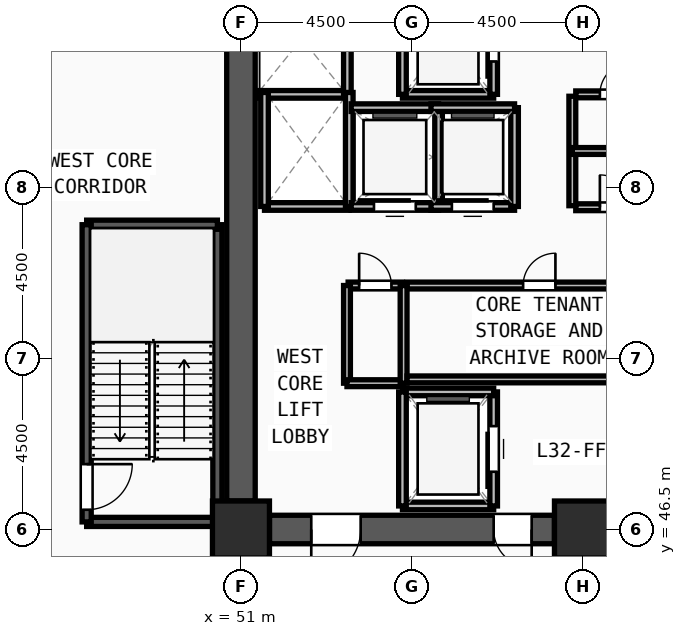
"""IFC4 building model, lengths in metres.
Left out: names, types, materials, properties, quantities, classifications, styles, units other than length and angle.
Written with IfcOpenShell. Run it as: python <this file> out.ifc"""

import sys

from ifc_helpers import new_model, si_unit, direction, frame, frame_2d, origin, origin_2d, place, context, subcontext, project, spatial, rectangle, extrude, source, transform, mapped, element, fill, save


model = new_model("IFC4")
c1 = context("Model", 3, precision=1e-05, world=origin(), true_north=direction((0.0, 1.0)))
c2 = subcontext(c1, "Body", "Model", "MODEL_VIEW")
j1 = project(units=[si_unit("LENGTHUNIT", "METRE"), si_unit("PLANEANGLEUNIT", "RADIAN")], contexts=[c1])
p1 = place(None, origin())
s1 = spatial("IfcSite", under=j1, at=p1, CompositionType="ELEMENT")
p2 = place(p1, origin())
s2 = spatial("IfcBuilding", under=s1, at=p2, CompositionType="ELEMENT")
p3 = place(p2, frame((0.0, 0.0, 124.5)))
s3 = spatial("IfcBuildingStorey", under=s2, at=p3, CompositionType="ELEMENT", Elevation=124.5)
m1 = source(origin(), c2, "Body", "SweptSolid", [
    extrude(rectangle(XDim=1.5, YDim=1.5, at=origin_2d()), origin(), (0.0, 0.0, 1.0), 3.75),
])
for number, where, z_axis, x_axis in (
    (1, (51.0, 46.5, 0.0), (0.0, 0.0, 1.0), (1.0, 0.0, 0.0)),
    (2, (60.0, 46.5, 0.0), (0.0, 0.0, 1.0), (1.0, 0.0, 0.0)),
):
    element("IfcColumn", number, at=place(p3, frame(where, z_axis=z_axis, x_axis=x_axis)), inside=s3, PredefinedType="COLUMN", context=c2, shape_type="MappedRepresentation", body=[
        mapped(m1, transform((0.0, 0.0, 0.0), x_axis=(1.0, 0.0, 0.0), y_axis=(0.0, 1.0, 0.0), z_axis=(0.0, 0.0, 1.0), scale=1.0)),
    ])
p4 = place(p3, frame((59.25, 46.5, 0.0), z_axis=(0.0, 0.0, 1.0), x_axis=(-1.0, 0.0, 0.0)))
e3 = element("IfcWall", 3, at=p4, inside=s3, PredefinedType="SHEAR", context=c2, shape_type="SweptSolid", body=[
    extrude(rectangle(XDim=7.5, YDim=0.75, at=frame_2d((3.75, 0.0))), origin(), (0.0, 0.0, 1.0), 3.57),
])
m2 = source(origin(), c2, "Body", "SweptSolid", [
    extrude(rectangle(XDim=1.3, YDim=2.2, at=frame_2d((0.65, 1.1))), frame((0.0, 0.385, 0.0), z_axis=(0.0, -1.0, 0.0), x_axis=(1.0, 0.0, 0.0)), (0.0, 0.0, 1.0), 0.77),
])
p5 = place(p4, frame((5.1, 0.0, 0.0)))
e4 = element("IfcOpeningElement", 4, at=p5, cuts=e3, PredefinedType="OPENING", context=c2, shape_type="MappedRepresentation", body=[
    mapped(m2, transform((0.0, 0.0, 0.0), x_axis=(1.0, 0.0, 0.0), y_axis=(0.0, 1.0, 0.0), z_axis=(0.0, 0.0, 1.0), scale=1.0)),
])
m3 = source(origin(), c2, "Body", "SweptSolid", [
    extrude(rectangle(XDim=1.0, YDim=2.2, at=frame_2d((0.5, 1.1))), frame((0.0, 0.385, 0.0), z_axis=(0.0, -1.0, 0.0), x_axis=(1.0, 0.0, 0.0)), (0.0, 0.0, 1.0), 0.77),
])
p6 = place(p4, frame((0.6, 0.0, 0.0)))
e5 = element("IfcOpeningElement", 5, at=p6, cuts=e3, PredefinedType="OPENING", context=c2, shape_type="MappedRepresentation", body=[
    mapped(m3, transform((0.0, 0.0, 0.0), x_axis=(1.0, 0.0, 0.0), y_axis=(0.0, 1.0, 0.0), z_axis=(0.0, 0.0, 1.0), scale=1.0)),
])
p7 = place(p3, frame((51.0, 47.25, 0.0), z_axis=(0.0, 0.0, 1.0), x_axis=(0.0, 1.0, 0.0)))
e6 = element("IfcWall", 6, at=p7, inside=s3, PredefinedType="SHEAR", context=c2, shape_type="SweptSolid", body=[
    extrude(rectangle(XDim=13.5, YDim=0.75, at=frame_2d((6.75, 0.0))), origin(), (0.0, 0.0, 1.0), 3.57),
])
p8 = place(p3, frame((46.94, 46.7, 0.0), z_axis=(0.0, 0.0, 1.0), x_axis=(1.0, 0.0, 0.0)))
e7 = element("IfcWall", 7, at=p8, inside=s3, PredefinedType="SOLIDWALL", context=c2, shape_type="SweptSolid", body=[
    extrude(rectangle(XDim=3.44, YDim=0.24, at=frame_2d((1.72, 0.0))), origin(), (0.0, 0.0, 1.0), 3.57),
])
p9 = place(p3, frame((50.38, 46.7, 0.0), z_axis=(0.0, 0.0, 1.0), x_axis=(0.0, 1.0, 0.0)))
e8 = element("IfcWall", 8, at=p9, inside=s3, PredefinedType="SOLIDWALL", context=c2, shape_type="SweptSolid", body=[
    extrude(rectangle(XDim=7.82, YDim=0.24, at=frame_2d((3.91, 0.0))), origin(), (0.0, 0.0, 1.0), 3.57),
])
p10 = place(p3, frame((50.38, 54.52, 0.0), z_axis=(0.0, 0.0, 1.0), x_axis=(-1.0, 0.0, 0.0)))
e9 = element("IfcWall", 9, at=p10, inside=s3, PredefinedType="SOLIDWALL", context=c2, shape_type="SweptSolid", body=[
    extrude(rectangle(XDim=3.44, YDim=0.24, at=frame_2d((1.72, 0.0))), origin(), (0.0, 0.0, 1.0), 3.57),
])
p11 = place(p3, frame((46.94, 54.52, 0.0), z_axis=(0.0, 0.0, 1.0), x_axis=(0.0, -1.0, 0.0)))
e10 = element("IfcWall", 10, at=p11, inside=s3, PredefinedType="SOLIDWALL", context=c2, shape_type="SweptSolid", body=[
    extrude(rectangle(XDim=7.82, YDim=0.24, at=frame_2d((3.91, 0.0))), origin(), (0.0, 0.0, 1.0), 3.57),
])
m4 = source(origin(), c2, "Body", "SweptSolid", [
    extrude(rectangle(XDim=1.2, YDim=2.2, at=frame_2d((0.6, 1.1))), frame((0.0, 0.13, 0.0), z_axis=(0.0, -1.0, 0.0), x_axis=(1.0, 0.0, 0.0)), (0.0, 0.0, 1.0), 0.26),
])
p12 = place(p11, frame((6.3, 0.0, 0.0)))
e11 = element("IfcOpeningElement", 11, at=p12, cuts=e10, PredefinedType="OPENING", context=c2, shape_type="MappedRepresentation", body=[
    mapped(m4, transform((0.0, 0.0, 0.0), x_axis=(1.0, 0.0, 0.0), y_axis=(0.0, 1.0, 0.0), z_axis=(0.0, 0.0, 1.0), scale=1.0)),
])
p13 = place(p3, frame((55.25, 47.12, 0.0), z_axis=(0.0, 0.0, 1.0), x_axis=(1.0, 0.0, 0.0)))
e12 = element("IfcWall", 12, at=p13, inside=s3, PredefinedType="SOLIDWALL", context=c2, shape_type="SweptSolid", body=[
    extrude(rectangle(XDim=2.4, YDim=0.2, at=frame_2d((1.2, 0.0))), origin(), (0.0, 0.0, 1.0), 3.57),
])
p14 = place(p3, frame((57.65, 47.12, 0.0), z_axis=(0.0, 0.0, 1.0), x_axis=(0.0, 1.0, 0.0)))
e13 = element("IfcWall", 13, at=p14, inside=s3, PredefinedType="SOLIDWALL", context=c2, shape_type="SweptSolid", body=[
    extrude(rectangle(XDim=3.0, YDim=0.2, at=frame_2d((1.5, 0.0))), origin(), (0.0, 0.0, 1.0), 3.57),
])
m5 = source(origin(), c2, "Body", "SweptSolid", [
    extrude(rectangle(XDim=1.2, YDim=2.3, at=frame_2d((0.6, 1.15))), frame((0.0, 0.11, 0.0), z_axis=(0.0, -1.0, 0.0), x_axis=(1.0, 0.0, 0.0)), (0.0, 0.0, 1.0), 0.22),
])
p15 = place(p14, frame((0.9, 0.0, 0.0)))
e14 = element("IfcOpeningElement", 14, at=p15, cuts=e13, PredefinedType="OPENING", context=c2, shape_type="MappedRepresentation", body=[
    mapped(m5, transform((0.0, 0.0, 0.0), x_axis=(1.0, 0.0, 0.0), y_axis=(0.0, 1.0, 0.0), z_axis=(0.0, 0.0, 1.0), scale=1.0)),
])
p16 = place(p3, frame((57.65, 50.12, 0.0), z_axis=(0.0, 0.0, 1.0), x_axis=(-1.0, 0.0, 0.0)))
e15 = element("IfcWall", 15, at=p16, inside=s3, PredefinedType="SOLIDWALL", context=c2, shape_type="SweptSolid", body=[
    extrude(rectangle(XDim=2.4, YDim=0.2, at=frame_2d((1.2, 0.0))), origin(), (0.0, 0.0, 1.0), 3.57),
])
p17 = place(p3, frame((55.25, 50.12, 0.0), z_axis=(0.0, 0.0, 1.0), x_axis=(0.0, -1.0, 0.0)))
e16 = element("IfcWall", 16, at=p17, inside=s3, PredefinedType="SOLIDWALL", context=c2, shape_type="SweptSolid", body=[
    extrude(rectangle(XDim=3.0, YDim=0.2, at=frame_2d((1.5, 0.0))), origin(), (0.0, 0.0, 1.0), 3.57),
])
p18 = place(p3, frame((55.25, 57.95, 0.0), z_axis=(0.0, 0.0, 1.0), x_axis=(1.0, 0.0, 0.0)))
e17 = element("IfcWall", 17, at=p18, inside=s3, PredefinedType="SOLIDWALL", context=c2, shape_type="SweptSolid", body=[
    extrude(rectangle(XDim=2.4, YDim=0.2, at=frame_2d((1.2, 0.0))), origin(), (0.0, 0.0, 1.0), 3.57),
])
p19 = place(p3, frame((57.65, 57.95, 0.0), z_axis=(0.0, 0.0, 1.0), x_axis=(0.0, 1.0, 0.0)))
e18 = element("IfcWall", 18, at=p19, inside=s3, PredefinedType="SOLIDWALL", context=c2, shape_type="SweptSolid", body=[
    extrude(rectangle(XDim=2.93, YDim=0.2, at=frame_2d((1.465, 0.0))), origin(), (0.0, 0.0, 1.0), 3.57),
])
p20 = place(p19, frame((0.865, 0.0, 0.0)))
e19 = element("IfcOpeningElement", 19, at=p20, cuts=e18, PredefinedType="OPENING", context=c2, shape_type="MappedRepresentation", body=[
    mapped(m5, transform((0.0, 0.0, 0.0), x_axis=(1.0, 0.0, 0.0), y_axis=(0.0, 1.0, 0.0), z_axis=(0.0, 0.0, 1.0), scale=1.0)),
])
p21 = place(p3, frame((55.25, 60.88, 0.0), z_axis=(0.0, 0.0, 1.0), x_axis=(0.0, -1.0, 0.0)))
e20 = element("IfcWall", 20, at=p21, inside=s3, PredefinedType="SOLIDWALL", context=c2, shape_type="SweptSolid", body=[
    extrude(rectangle(XDim=2.93, YDim=0.2, at=frame_2d((1.465, 0.0))), origin(), (0.0, 0.0, 1.0), 3.57),
])
p22 = place(p3, frame((51.4, 57.95, 0.0), z_axis=(0.0, 0.0, 1.0), x_axis=(1.0, 0.0, 0.0)))
e21 = element("IfcWall", 21, at=p22, inside=s3, PredefinedType="SOLIDWALL", context=c2, shape_type="SweptSolid", body=[
    extrude(rectangle(XDim=2.4, YDim=0.2, at=frame_2d((1.2, 0.0))), origin(), (0.0, 0.0, 1.0), 3.57),
])
p23 = place(p3, frame((53.8, 57.95, 0.0), z_axis=(0.0, 0.0, 1.0), x_axis=(0.0, 1.0, 0.0)))
e22 = element("IfcWall", 22, at=p23, inside=s3, PredefinedType="SOLIDWALL", context=c2, shape_type="SweptSolid", body=[
    extrude(rectangle(XDim=2.93, YDim=0.2, at=frame_2d((1.465, 0.0))), origin(), (0.0, 0.0, 1.0), 3.57),
])
p24 = place(p3, frame((51.62, 55.0, 0.0), z_axis=(0.0, 0.0, 1.0), x_axis=(1.0, 0.0, 0.0)))
e23 = element("IfcWall", 23, at=p24, inside=s3, PredefinedType="SOLIDWALL", context=c2, shape_type="SweptSolid", body=[
    extrude(rectangle(XDim=2.23, YDim=0.2, at=frame_2d((1.115, 0.0))), origin(), (0.0, 0.0, 1.0), 3.57),
])
for number, where, z_axis, x_axis in (
    (24, (53.85, 55.0, 0.0), (0.0, 0.0, 1.0), (0.0, 1.0, 0.0)),
    (25, (51.62, 58.0, 0.0), (0.0, 0.0, 1.0), (0.0, -1.0, 0.0)),
):
    element("IfcWall", number, at=place(p3, frame(where, z_axis=z_axis, x_axis=x_axis)), inside=s3, PredefinedType="SOLIDWALL", context=c2, shape_type="SweptSolid", body=[
        extrude(rectangle(XDim=3.0, YDim=0.2, at=frame_2d((1.5, 0.0))), origin(), (0.0, 0.0, 1.0), 3.57),
    ])
p25 = place(p3, frame((53.9, 55.0, 0.0), z_axis=(0.0, 0.0, 1.0), x_axis=(1.0, 0.0, 0.0)))
e26 = element("IfcWall", 26, at=p25, inside=s3, PredefinedType="SOLIDWALL", context=c2, shape_type="SweptSolid", body=[
    extrude(rectangle(XDim=2.3, YDim=0.2, at=frame_2d((1.15, 0.0))), origin(), (0.0, 0.0, 1.0), 3.57),
])
m6 = source(origin(), c2, "Body", "SweptSolid", [
    extrude(rectangle(XDim=1.1, YDim=2.2, at=frame_2d((0.55, 1.1))), frame((0.0, 0.11, 0.0), z_axis=(0.0, -1.0, 0.0), x_axis=(1.0, 0.0, 0.0)), (0.0, 0.0, 1.0), 0.22),
])
p26 = place(p25, frame((0.6, 0.0, 0.0)))
e27 = element("IfcOpeningElement", 27, at=p26, cuts=e26, PredefinedType="OPENING", context=c2, shape_type="MappedRepresentation", body=[
    mapped(m6, transform((0.0, 0.0, 0.0), x_axis=(1.0, 0.0, 0.0), y_axis=(0.0, 1.0, 0.0), z_axis=(0.0, 0.0, 1.0), scale=1.0)),
])
p27 = place(p3, frame((56.2, 55.0, 0.0), z_axis=(0.0, 0.0, 1.0), x_axis=(0.0, 1.0, 0.0)))
e28 = element("IfcWall", 28, at=p27, inside=s3, PredefinedType="SOLIDWALL", context=c2, shape_type="SweptSolid", body=[
    extrude(rectangle(XDim=2.6, YDim=0.2, at=frame_2d((1.3, 0.0))), origin(), (0.0, 0.0, 1.0), 3.57),
])
p28 = place(p3, frame((56.2, 57.6, 0.0), z_axis=(0.0, 0.0, 1.0), x_axis=(-1.0, 0.0, 0.0)))
e29 = element("IfcWall", 29, at=p28, inside=s3, PredefinedType="SOLIDWALL", context=c2, shape_type="SweptSolid", body=[
    extrude(rectangle(XDim=2.3, YDim=0.2, at=frame_2d((1.15, 0.0))), origin(), (0.0, 0.0, 1.0), 3.57),
])
p29 = place(p3, frame((56.0, 55.0, 0.0), z_axis=(0.0, 0.0, 1.0), x_axis=(1.0, 0.0, 0.0)))
e30 = element("IfcWall", 30, at=p29, inside=s3, PredefinedType="SOLIDWALL", context=c2, shape_type="SweptSolid", body=[
    extrude(rectangle(XDim=2.2, YDim=0.2, at=frame_2d((1.1, 0.0))), origin(), (0.0, 0.0, 1.0), 3.57),
])
p30 = place(p29, frame((0.55, 0.0, 0.0)))
e31 = element("IfcOpeningElement", 31, at=p30, cuts=e30, PredefinedType="OPENING", context=c2, shape_type="MappedRepresentation", body=[
    mapped(m6, transform((0.0, 0.0, 0.0), x_axis=(1.0, 0.0, 0.0), y_axis=(0.0, 1.0, 0.0), z_axis=(0.0, 0.0, 1.0), scale=1.0)),
])
p31 = place(p3, frame((58.2, 55.0, 0.0), z_axis=(0.0, 0.0, 1.0), x_axis=(0.0, 1.0, 0.0)))
e32 = element("IfcWall", 32, at=p31, inside=s3, PredefinedType="SOLIDWALL", context=c2, shape_type="SweptSolid", body=[
    extrude(rectangle(XDim=2.6, YDim=0.2, at=frame_2d((1.3, 0.0))), origin(), (0.0, 0.0, 1.0), 3.57),
])
p32 = place(p3, frame((58.2, 57.6, 0.0), z_axis=(0.0, 0.0, 1.0), x_axis=(-1.0, 0.0, 0.0)))
e33 = element("IfcWall", 33, at=p32, inside=s3, PredefinedType="SOLIDWALL", context=c2, shape_type="SweptSolid", body=[
    extrude(rectangle(XDim=2.2, YDim=0.2, at=frame_2d((1.1, 0.0))), origin(), (0.0, 0.0, 1.0), 3.57),
])
p33 = place(p3, frame((55.37, 52.92, 0.0), z_axis=(0.0, 0.0, 1.0), x_axis=(1.0, 0.0, 0.0)))
e34 = element("IfcWall", 34, at=p33, inside=s3, PredefinedType="PARTITIONING", context=c2, shape_type="SweptSolid", body=[
    extrude(rectangle(XDim=6.93, YDim=0.18, at=frame_2d((3.465, 0.0))), origin(), (0.0, 0.0, 1.0), 3.57),
])
m7 = source(origin(), c2, "Body", "SweptSolid", [
    extrude(rectangle(XDim=0.85, YDim=2.1, at=frame_2d((0.425, 1.05))), frame((0.0, 0.1, 0.0), z_axis=(0.0, -1.0, 0.0), x_axis=(1.0, 0.0, 0.0)), (0.0, 0.0, 1.0), 0.2),
])
p34 = place(p33, frame((3.055, 0.0, 0.0)))
e35 = element("IfcOpeningElement", 35, at=p34, cuts=e34, PredefinedType="OPENING", context=c2, shape_type="MappedRepresentation", body=[
    mapped(m7, transform((0.0, 0.0, 0.0), x_axis=(1.0, 0.0, 0.0), y_axis=(0.0, 1.0, 0.0), z_axis=(0.0, 0.0, 1.0), scale=1.0)),
])
p35 = place(p3, frame((59.81, 54.98, 0.0), z_axis=(0.0, 0.0, 1.0), x_axis=(1.0, 0.0, 0.0)))
e36 = element("IfcWall", 36, at=p35, inside=s3, PredefinedType="PARTITIONING", context=c2, shape_type="SweptSolid", body=[
    extrude(rectangle(XDim=2.11, YDim=0.18, at=frame_2d((1.055, 0.0))), origin(), (0.0, 0.0, 1.0), 3.57),
])
p36 = place(p35, frame((0.635, 0.0, 0.0)))
e37 = element("IfcOpeningElement", 37, at=p36, cuts=e36, PredefinedType="OPENING", context=c2, shape_type="MappedRepresentation", body=[
    mapped(m7, transform((0.0, 0.0, 0.0), x_axis=(1.0, 0.0, 0.0), y_axis=(0.0, 1.0, 0.0), z_axis=(0.0, 0.0, 1.0), scale=1.0)),
])
p37 = place(p3, frame((59.81, 57.95, 0.0), z_axis=(0.0, 0.0, 1.0), x_axis=(1.0, 0.0, 0.0)))
e38 = element("IfcWall", 38, at=p37, inside=s3, PredefinedType="PARTITIONING", context=c2, shape_type="SweptSolid", body=[
    extrude(rectangle(XDim=2.11, YDim=0.18, at=frame_2d((1.055, 0.0))), origin(), (0.0, 0.0, 1.0), 3.57),
])
p38 = place(p37, frame((0.635, 0.0, 0.0)))
e39 = element("IfcOpeningElement", 39, at=p38, cuts=e38, PredefinedType="OPENING", context=c2, shape_type="MappedRepresentation", body=[
    mapped(m7, transform((0.0, 0.0, 0.0), x_axis=(1.0, 0.0, 0.0), y_axis=(0.0, 1.0, 0.0), z_axis=(0.0, 0.0, 1.0), scale=1.0)),
])
p39 = place(p3, frame((53.82, 52.92, 0.0), z_axis=(0.0, 0.0, 1.0), x_axis=(1.0, 0.0, 0.0)))
e40 = element("IfcWall", 40, at=p39, inside=s3, PredefinedType="PARTITIONING", context=c2, shape_type="SweptSolid", body=[
    extrude(rectangle(XDim=1.43, YDim=0.18, at=frame_2d((0.715, 0.0))), origin(), (0.0, 0.0, 1.0), 3.57),
])
p40 = place(p39, frame((0.29, 0.0, 0.0)))
e41 = element("IfcOpeningElement", 41, at=p40, cuts=e40, PredefinedType="OPENING", context=c2, shape_type="MappedRepresentation", body=[
    mapped(m7, transform((0.0, 0.0, 0.0), x_axis=(1.0, 0.0, 0.0), y_axis=(0.0, 1.0, 0.0), z_axis=(0.0, 0.0, 1.0), scale=1.0)),
])
p41 = place(p3, frame((59.72, 55.02, 0.0), z_axis=(0.0, 0.0, 1.0), x_axis=(0.0, 1.0, 0.0)))
e42 = element("IfcWall", 42, at=p41, inside=s3, PredefinedType="PARTITIONING", context=c2, shape_type="SweptSolid", body=[
    extrude(rectangle(XDim=2.88, YDim=0.18, at=frame_2d((1.44, 0.0))), origin(), (0.0, 0.0, 1.0), 3.57),
])
p42 = place(p3, frame((59.72, 56.46, 0.0), z_axis=(0.0, 0.0, 1.0), x_axis=(1.0, 0.0, 0.0)))
e43 = element("IfcWall", 43, at=p42, inside=s3, PredefinedType="PARTITIONING", context=c2, shape_type="SweptSolid", body=[
    extrude(rectangle(XDim=2.29, YDim=0.18, at=frame_2d((1.145, 0.0))), origin(), (0.0, 0.0, 1.0), 3.57),
])
p43 = place(p3, frame((53.79, 50.35, 0.0), z_axis=(0.0, 0.0, 1.0), x_axis=(0.0, 1.0, 0.0)))
e44 = element("IfcWall", 44, at=p43, inside=s3, PredefinedType="PARTITIONING", context=c2, shape_type="SweptSolid", body=[
    extrude(rectangle(XDim=2.57, YDim=0.18, at=frame_2d((1.285, 0.0))), origin(), (0.0, 0.0, 1.0), 3.57),
])
p44 = place(p3, frame((53.79, 50.35, 0.0), z_axis=(0.0, 0.0, 1.0), x_axis=(1.0, 0.0, 0.0)))
e45 = element("IfcWall", 45, at=p44, inside=s3, PredefinedType="PARTITIONING", context=c2, shape_type="SweptSolid", body=[
    extrude(rectangle(XDim=1.49, YDim=0.18, at=frame_2d((0.745, 0.0))), origin(), (0.0, 0.0, 1.0), 3.57),
])
p45 = place(p3, frame((55.28, 50.35, 0.0), z_axis=(0.0, 0.0, 1.0), x_axis=(0.0, 1.0, 0.0)))
e46 = element("IfcWall", 46, at=p45, inside=s3, PredefinedType="PARTITIONING", context=c2, shape_type="SweptSolid", body=[
    extrude(rectangle(XDim=2.57, YDim=0.18, at=frame_2d((1.285, 0.0))), origin(), (0.0, 0.0, 1.0), 3.57),
])
p46 = place(p3, frame((55.37, 50.45, 0.0), z_axis=(0.0, 0.0, 1.0), x_axis=(1.0, 0.0, 0.0)))
e47 = element("IfcWall", 47, at=p46, inside=s3, PredefinedType="PARTITIONING", context=c2, shape_type="SweptSolid", body=[
    extrude(rectangle(XDim=6.93, YDim=0.18, at=frame_2d((3.465, 0.0))), origin(), (0.0, 0.0, 1.0), 3.57),
])
m8 = source(origin(), c2, "Body", "SweptSolid", [
    extrude(rectangle(XDim=1.3, YDim=2.2, at=frame_2d((0.65, 1.1))), frame((0.0, 0.025, 0.0), z_axis=(0.0, -1.0, 0.0), x_axis=(1.0, 0.0, 0.0)), (0.0, 0.0, 1.0), 0.05),
])
p47 = place(p5, origin())
e48 = element("IfcDoor", 48, at=p47, inside=s3, OperationType="SINGLE_SWING_RIGHT", PredefinedType="DOOR", context=c2, shape_type="MappedRepresentation", body=[
    mapped(m8, transform((0.0, 0.0, 0.0), x_axis=(1.0, 0.0, 0.0), y_axis=(0.0, 1.0, 0.0), z_axis=(0.0, 0.0, 1.0), scale=1.0)),
])
fill(e4, e48)
m9 = source(origin(), c2, "Body", "SweptSolid", [
    extrude(rectangle(XDim=1.0, YDim=2.2, at=frame_2d((0.5, 1.1))), frame((0.0, 0.025, 0.0), z_axis=(0.0, -1.0, 0.0), x_axis=(1.0, 0.0, 0.0)), (0.0, 0.0, 1.0), 0.05),
])
p48 = place(p6, origin())
e49 = element("IfcDoor", 49, at=p48, inside=s3, OperationType="SINGLE_SWING_LEFT", PredefinedType="DOOR", context=c2, shape_type="MappedRepresentation", body=[
    mapped(m9, transform((0.0, 0.0, 0.0), x_axis=(1.0, 0.0, 0.0), y_axis=(0.0, 1.0, 0.0), z_axis=(0.0, 0.0, 1.0), scale=1.0)),
])
fill(e5, e49)
m10 = source(origin(), c2, "Body", "SweptSolid", [
    extrude(rectangle(XDim=1.2, YDim=2.2, at=frame_2d((0.6, 1.1))), frame((0.0, 0.025, 0.0), z_axis=(0.0, -1.0, 0.0), x_axis=(1.0, 0.0, 0.0)), (0.0, 0.0, 1.0), 0.05),
])
p49 = place(p12, origin())
e50 = element("IfcDoor", 50, at=p49, inside=s3, OperationType="SINGLE_SWING_LEFT", PredefinedType="DOOR", context=c2, shape_type="MappedRepresentation", body=[
    mapped(m10, transform((0.0, 0.0, 0.0), x_axis=(1.0, 0.0, 0.0), y_axis=(0.0, 1.0, 0.0), z_axis=(0.0, 0.0, 1.0), scale=1.0)),
])
fill(e11, e50)
m11 = source(origin(), c2, "Body", "SweptSolid", [
    extrude(rectangle(XDim=1.2, YDim=2.3, at=frame_2d((0.6, 1.15))), frame((0.0, 0.025, 0.0), z_axis=(0.0, -1.0, 0.0), x_axis=(1.0, 0.0, 0.0)), (0.0, 0.0, 1.0), 0.05),
])
p50 = place(p15, origin())
e51 = element("IfcDoor", 51, at=p50, inside=s3, OperationType="SLIDING_TO_LEFT", PredefinedType="DOOR", context=c2, shape_type="MappedRepresentation", body=[
    mapped(m11, transform((0.0, 0.0, 0.0), x_axis=(1.0, 0.0, 0.0), y_axis=(0.0, 1.0, 0.0), z_axis=(0.0, 0.0, 1.0), scale=1.0)),
])
fill(e14, e51)
p51 = place(p20, origin())
e52 = element("IfcDoor", 52, at=p51, inside=s3, OperationType="SLIDING_TO_LEFT", PredefinedType="DOOR", context=c2, shape_type="MappedRepresentation", body=[
    mapped(m11, transform((0.0, 0.0, 0.0), x_axis=(1.0, 0.0, 0.0), y_axis=(0.0, 1.0, 0.0), z_axis=(0.0, 0.0, 1.0), scale=1.0)),
])
fill(e19, e52)
m12 = source(origin(), c2, "Body", "SweptSolid", [
    extrude(rectangle(XDim=1.1, YDim=2.2, at=frame_2d((0.55, 1.1))), frame((0.0, 0.025, 0.0), z_axis=(0.0, -1.0, 0.0), x_axis=(1.0, 0.0, 0.0)), (0.0, 0.0, 1.0), 0.05),
])
p52 = place(p26, origin())
e53 = element("IfcDoor", 53, at=p52, inside=s3, OperationType="SLIDING_TO_LEFT", PredefinedType="DOOR", context=c2, shape_type="MappedRepresentation", body=[
    mapped(m12, transform((0.0, 0.0, 0.0), x_axis=(1.0, 0.0, 0.0), y_axis=(0.0, 1.0, 0.0), z_axis=(0.0, 0.0, 1.0), scale=1.0)),
])
fill(e27, e53)
p53 = place(p30, origin())
e54 = element("IfcDoor", 54, at=p53, inside=s3, OperationType="SLIDING_TO_LEFT", PredefinedType="DOOR", context=c2, shape_type="MappedRepresentation", body=[
    mapped(m12, transform((0.0, 0.0, 0.0), x_axis=(1.0, 0.0, 0.0), y_axis=(0.0, 1.0, 0.0), z_axis=(0.0, 0.0, 1.0), scale=1.0)),
])
fill(e31, e54)
m13 = source(origin(), c2, "Body", "SweptSolid", [
    extrude(rectangle(XDim=0.85, YDim=2.1, at=frame_2d((0.425, 1.05))), frame((0.0, 0.025, 0.0), z_axis=(0.0, -1.0, 0.0), x_axis=(1.0, 0.0, 0.0)), (0.0, 0.0, 1.0), 0.05),
])
p54 = place(p34, origin())
e55 = element("IfcDoor", 55, at=p54, inside=s3, OperationType="SINGLE_SWING_RIGHT", PredefinedType="DOOR", context=c2, shape_type="MappedRepresentation", body=[
    mapped(m13, transform((0.0, 0.0, 0.0), x_axis=(1.0, 0.0, 0.0), y_axis=(0.0, 1.0, 0.0), z_axis=(0.0, 0.0, 1.0), scale=1.0)),
])
fill(e35, e55)
p55 = place(p36, origin())
e56 = element("IfcDoor", 56, at=p55, inside=s3, OperationType="SINGLE_SWING_LEFT", PredefinedType="DOOR", context=c2, shape_type="MappedRepresentation", body=[
    mapped(m13, transform((0.0, 0.0, 0.0), x_axis=(1.0, 0.0, 0.0), y_axis=(0.0, 1.0, 0.0), z_axis=(0.0, 0.0, 1.0), scale=1.0)),
])
fill(e37, e56)
p56 = place(p38, origin())
e57 = element("IfcDoor", 57, at=p56, inside=s3, OperationType="SINGLE_SWING_RIGHT", PredefinedType="DOOR", context=c2, shape_type="MappedRepresentation", body=[
    mapped(m13, transform((0.0, 0.0, 0.0), x_axis=(1.0, 0.0, 0.0), y_axis=(0.0, 1.0, 0.0), z_axis=(0.0, 0.0, 1.0), scale=1.0)),
])
fill(e39, e57)
p57 = place(p40, origin())
e58 = element("IfcDoor", 58, at=p57, inside=s3, OperationType="SINGLE_SWING_LEFT", PredefinedType="DOOR", context=c2, shape_type="MappedRepresentation", body=[
    mapped(m13, transform((0.0, 0.0, 0.0), x_axis=(1.0, 0.0, 0.0), y_axis=(0.0, 1.0, 0.0), z_axis=(0.0, 0.0, 1.0), scale=1.0)),
])
fill(e41, e58)
save(model, sys.argv[1])
